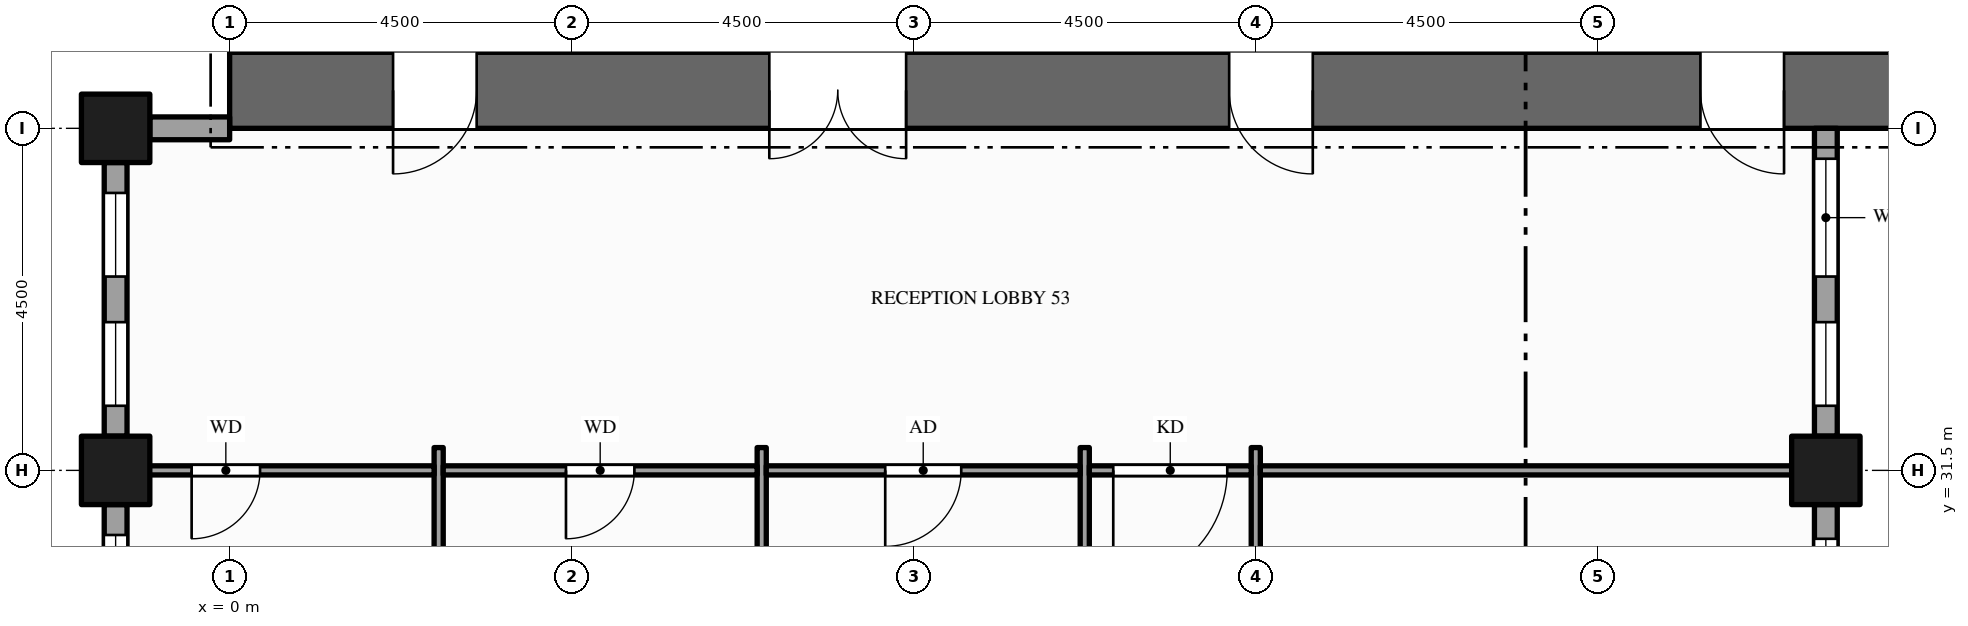
"""IFC4 building model, lengths in metres.
Left out: names, types, materials, properties, quantities, classifications, styles, units other than length and angle.
Written with IfcOpenShell. Run it as: python <this file> out.ifc"""

import sys

from ifc_helpers import new_model, si_unit, direction, frame, frame_2d, origin, origin_2d, place, context, subcontext, project, spatial, rectangle, hollow_rectangle, extrude, element, fill, save


model = new_model("IFC4")
c1 = context("Model", 3, precision=1e-05, world=origin(), true_north=direction((0.0, 1.0)))
c2 = subcontext(c1, "Body", "Model", "MODEL_VIEW")
j1 = project(units=[si_unit("LENGTHUNIT", "METRE"), si_unit("PLANEANGLEUNIT", "RADIAN")], contexts=[c1])
p1 = place(None, origin())
s1 = spatial("IfcSite", under=j1, at=p1, CompositionType="ELEMENT")
p2 = place(p1, origin())
s2 = spatial("IfcBuilding", under=s1, at=p2, CompositionType="ELEMENT")
p3 = place(p2, frame((0.0, 0.0, 179.0)))
s3 = spatial("IfcBuildingStorey", under=s2, at=p3, CompositionType="ELEMENT", Elevation=179.0)
p4 = place(p3, frame((0.0, 36.5, -0.15), z_axis=(0.0, 0.0, 1.0), x_axis=(1.0, 0.0, 0.0)))
e1 = element("IfcWall", 1, at=p4, inside=s3, PredefinedType="SHEAR", context=c2, shape_type="SweptSolid", body=[
    extrude(rectangle(XDim=22.5, YDim=1.0, at=frame_2d((11.25, 0.0))), origin(), (0.0, 0.0, 1.0), 4.0),
])
p5 = place(p4, frame((7.1, 0.0, 0.15)))
e2 = element("IfcOpeningElement", 2, at=p5, cuts=e1, PredefinedType="OPENING", context=c2, shape_type="SweptSolid", body=[
    extrude(rectangle(XDim=1.8, YDim=2.1, at=frame_2d((0.9, 1.05))), frame((0.0, 0.51, 0.0), z_axis=(0.0, -1.0, 0.0), x_axis=(1.0, 0.0, 0.0)), (0.0, 0.0, 1.0), 1.02),
])
p6 = place(p4, frame((13.15, 0.0, 0.15)))
e3 = element("IfcOpeningElement", 3, at=p6, cuts=e1, PredefinedType="OPENING", context=c2, shape_type="SweptSolid", body=[
    extrude(rectangle(XDim=1.1, YDim=2.1, at=frame_2d((0.55, 1.05))), frame((0.0, 0.51, 0.0), z_axis=(0.0, -1.0, 0.0), x_axis=(1.0, 0.0, 0.0)), (0.0, 0.0, 1.0), 1.02),
])
p7 = place(p4, frame((2.15, 0.0, 0.15)))
e4 = element("IfcOpeningElement", 4, at=p7, cuts=e1, PredefinedType="OPENING", context=c2, shape_type="SweptSolid", body=[
    extrude(rectangle(XDim=1.1, YDim=2.1, at=frame_2d((0.55, 1.05))), frame((0.0, 0.51, 0.0), z_axis=(0.0, -1.0, 0.0), x_axis=(1.0, 0.0, 0.0)), (0.0, 0.0, 1.0), 1.02),
])
p8 = place(p4, frame((19.35, 0.0, 0.15)))
e5 = element("IfcOpeningElement", 5, at=p8, cuts=e1, PredefinedType="OPENING", context=c2, shape_type="SweptSolid", body=[
    extrude(rectangle(XDim=1.1, YDim=2.1, at=frame_2d((0.55, 1.05))), frame((0.0, 0.51, 0.0), z_axis=(0.0, -1.0, 0.0), x_axis=(1.0, 0.0, 0.0)), (0.0, 0.0, 1.0), 1.02),
])
for number, where, z_axis, x_axis in (
    (6, (-1.5, 31.5, -0.15), (0.0, 0.0, 1.0), (1.0, 0.0, 0.0)),
    (7, (-1.5, 36.0, -0.15), (0.0, 0.0, 1.0), (1.0, 0.0, 0.0)),
    (8, (21.0, 31.5, -0.15), (0.0, 0.0, 1.0), (1.0, 0.0, 0.0)),
):
    element("IfcColumn", number, at=place(p3, frame(where, z_axis=z_axis, x_axis=x_axis)), inside=s3, PredefinedType="COLUMN", context=c2, shape_type="SweptSolid", body=[
        extrude(hollow_rectangle(XDim=0.9, YDim=0.9, WallThickness=0.045, at=origin_2d()), origin(), (0.0, 0.0, 1.0), 4.0),
    ])
p9 = place(p3, frame((21.0, 28.95, 0.0), z_axis=(0.0, 0.0, 1.0), x_axis=(0.0, 1.0, 0.0)))
e9 = element("IfcWall", 9, at=p9, inside=s3, PredefinedType="STANDARD", context=c2, shape_type="SweptSolid", body=[
    extrude(rectangle(XDim=2.1, YDim=0.3, at=frame_2d((1.05, 0.0))), origin(), (0.0, 0.0, 1.0), 3.149),
])
p10 = place(p9, frame((0.45, 0.0, 0.9)))
e10 = element("IfcOpeningElement", 10, at=p10, cuts=e9, PredefinedType="OPENING", context=c2, shape_type="SweptSolid", body=[
    extrude(rectangle(XDim=1.2, YDim=2.0, at=frame_2d((0.6, 1.0))), frame((0.0, 0.16, 0.0), z_axis=(0.0, -1.0, 0.0), x_axis=(1.0, 0.0, 0.0)), (0.0, 0.0, 1.0), 0.32),
])
p11 = place(p3, frame((21.0, 31.95, 0.0), z_axis=(0.0, 0.0, 1.0), x_axis=(0.0, 1.0, 0.0)))
e11 = element("IfcWall", 11, at=p11, inside=s3, PredefinedType="STANDARD", context=c2, shape_type="SweptSolid", body=[
    extrude(rectangle(XDim=4.05, YDim=0.3, at=frame_2d((2.025, 0.0))), origin(), (0.0, 0.0, 1.0), 3.149),
])
p12 = place(p11, frame((0.4, 0.0, 0.9)))
e12 = element("IfcOpeningElement", 12, at=p12, cuts=e11, PredefinedType="OPENING", context=c2, shape_type="SweptSolid", body=[
    extrude(rectangle(XDim=1.1, YDim=2.0, at=frame_2d((0.55, 1.0))), frame((0.0, 0.16, 0.0), z_axis=(0.0, -1.0, 0.0), x_axis=(1.0, 0.0, 0.0)), (0.0, 0.0, 1.0), 0.32),
])
p13 = place(p11, frame((2.1, 0.0, 0.9)))
e13 = element("IfcOpeningElement", 13, at=p13, cuts=e11, PredefinedType="OPENING", context=c2, shape_type="SweptSolid", body=[
    extrude(rectangle(XDim=1.55, YDim=2.0, at=frame_2d((0.775, 1.0))), frame((0.0, 0.16, 0.0), z_axis=(0.0, -1.0, 0.0), x_axis=(1.0, 0.0, 0.0)), (0.0, 0.0, 1.0), 0.32),
])
p14 = place(p3, frame((0.0, 36.0, 0.0), z_axis=(0.0, 0.0, 1.0), x_axis=(-1.0, 0.0, 0.0)))
e14 = element("IfcWall", 14, at=p14, inside=s3, PredefinedType="STANDARD", context=c2, shape_type="SweptSolid", body=[
    extrude(rectangle(XDim=1.05, YDim=0.3, at=frame_2d((0.525, 0.0))), origin(), (0.0, 0.0, 1.0), 2.87),
])
p15 = place(p3, frame((-1.5, 35.55, 0.0), z_axis=(0.0, 0.0, 1.0), x_axis=(0.0, -1.0, 0.0)))
e15 = element("IfcWall", 15, at=p15, inside=s3, PredefinedType="STANDARD", context=c2, shape_type="SweptSolid", body=[
    extrude(rectangle(XDim=3.6, YDim=0.3, at=frame_2d((1.8, 0.0))), origin(), (0.0, 0.0, 1.0), 3.149),
])
p16 = place(p15, frame((0.4, 0.0, 0.9)))
e16 = element("IfcOpeningElement", 16, at=p16, cuts=e15, PredefinedType="OPENING", context=c2, shape_type="SweptSolid", body=[
    extrude(rectangle(XDim=1.1, YDim=2.0, at=frame_2d((0.55, 1.0))), frame((0.0, 0.16, 0.0), z_axis=(0.0, -1.0, 0.0), x_axis=(1.0, 0.0, 0.0)), (0.0, 0.0, 1.0), 0.32),
])
p17 = place(p15, frame((2.1, 0.0, 0.9)))
e17 = element("IfcOpeningElement", 17, at=p17, cuts=e15, PredefinedType="OPENING", context=c2, shape_type="SweptSolid", body=[
    extrude(rectangle(XDim=1.1, YDim=2.0, at=frame_2d((0.55, 1.0))), frame((0.0, 0.16, 0.0), z_axis=(0.0, -1.0, 0.0), x_axis=(1.0, 0.0, 0.0)), (0.0, 0.0, 1.0), 0.32),
])
p18 = place(p3, frame((-1.5, 31.05, 0.0), z_axis=(0.0, 0.0, 1.0), x_axis=(0.0, -1.0, 0.0)))
e18 = element("IfcWall", 18, at=p18, inside=s3, PredefinedType="STANDARD", context=c2, shape_type="SweptSolid", body=[
    extrude(rectangle(XDim=3.6, YDim=0.3, at=frame_2d((1.8, 0.0))), origin(), (0.0, 0.0, 1.0), 3.149),
])
p19 = place(p18, frame((0.4, 0.0, 0.9)))
e19 = element("IfcOpeningElement", 19, at=p19, cuts=e18, PredefinedType="OPENING", context=c2, shape_type="SweptSolid", body=[
    extrude(rectangle(XDim=1.1, YDim=2.0, at=frame_2d((0.55, 1.0))), frame((0.0, 0.16, 0.0), z_axis=(0.0, -1.0, 0.0), x_axis=(1.0, 0.0, 0.0)), (0.0, 0.0, 1.0), 0.32),
])
p20 = place(p18, frame((2.1, 0.0, 0.9)))
e20 = element("IfcOpeningElement", 20, at=p20, cuts=e18, PredefinedType="OPENING", context=c2, shape_type="SweptSolid", body=[
    extrude(rectangle(XDim=1.1, YDim=2.0, at=frame_2d((0.55, 1.0))), frame((0.0, 0.16, 0.0), z_axis=(0.0, -1.0, 0.0), x_axis=(1.0, 0.0, 0.0)), (0.0, 0.0, 1.0), 0.32),
])
for number, where, z_axis, x_axis in (
    (21, (2.75, 26.7, 0.0), (0.0, 0.0, 1.0), (0.0, 1.0, 0.0)),
    (22, (7.0, 26.7, 0.0), (0.0, 0.0, 1.0), (0.0, 1.0, 0.0)),
):
    element("IfcWall", number, at=place(p3, frame(where, z_axis=z_axis, x_axis=x_axis)), inside=s3, PredefinedType="PARTITIONING", context=c2, shape_type="SweptSolid", body=[
        extrude(rectangle(XDim=5.1, YDim=0.12, at=frame_2d((2.55, 0.0))), origin(), (0.0, 0.0, 1.0), 3.85),
    ])
p21 = place(p3, frame((11.25, 10.95, 0.0), z_axis=(0.0, 0.0, 1.0), x_axis=(0.0, 1.0, 0.0)))
e23 = element("IfcWall", 23, at=p21, inside=s3, PredefinedType="PARTITIONING", context=c2, shape_type="SweptSolid", body=[
    extrude(rectangle(XDim=20.85, YDim=0.12, at=frame_2d((10.425, 0.0))), origin(), (0.0, 0.0, 1.0), 2.6),
])
p22 = place(p21, frame((2.05, 0.0, 0.0)))
e24 = element("IfcOpeningElement", 24, at=p22, cuts=e23, PredefinedType="OPENING", context=c2, shape_type="SweptSolid", body=[
    extrude(rectangle(XDim=1.0, YDim=2.1, at=frame_2d((0.5, 1.05))), frame((0.0, 0.07, 0.0), z_axis=(0.0, -1.0, 0.0), x_axis=(1.0, 0.0, 0.0)), (0.0, 0.0, 1.0), 0.14),
])
p23 = place(p21, frame((6.55, 0.0, 0.0)))
e25 = element("IfcOpeningElement", 25, at=p23, cuts=e23, PredefinedType="OPENING", context=c2, shape_type="SweptSolid", body=[
    extrude(rectangle(XDim=1.0, YDim=2.1, at=frame_2d((0.5, 1.05))), frame((0.0, 0.07, 0.0), z_axis=(0.0, -1.0, 0.0), x_axis=(1.0, 0.0, 0.0)), (0.0, 0.0, 1.0), 0.14),
])
p24 = place(p21, frame((12.205, 0.0, 0.0)))
e26 = element("IfcOpeningElement", 26, at=p24, cuts=e23, PredefinedType="OPENING", context=c2, shape_type="SweptSolid", body=[
    extrude(rectangle(XDim=1.0, YDim=2.1, at=frame_2d((0.5, 1.05))), frame((0.0, 0.07, 0.0), z_axis=(0.0, -1.0, 0.0), x_axis=(1.0, 0.0, 0.0)), (0.0, 0.0, 1.0), 0.14),
])
p25 = place(p3, frame((13.5, 10.95, 0.0), z_axis=(0.0, 0.0, 1.0), x_axis=(0.0, 1.0, 0.0)))
e27 = element("IfcWall", 27, at=p25, inside=s3, PredefinedType="PARTITIONING", context=c2, shape_type="SweptSolid", body=[
    extrude(rectangle(XDim=20.85, YDim=0.12, at=frame_2d((10.425, 0.0))), origin(), (0.0, 0.0, 1.0), 2.6),
])
p26 = place(p25, frame((4.2, 0.0, 0.0)))
e28 = element("IfcOpeningElement", 28, at=p26, cuts=e27, PredefinedType="OPENING", context=c2, shape_type="SweptSolid", body=[
    extrude(rectangle(XDim=1.2, YDim=2.1, at=frame_2d((0.6, 1.05))), frame((0.0, 0.07, 0.0), z_axis=(0.0, -1.0, 0.0), x_axis=(1.0, 0.0, 0.0)), (0.0, 0.0, 1.0), 0.14),
])
p27 = place(p3, frame((-1.35, 31.5, 0.0), z_axis=(0.0, 0.0, 1.0), x_axis=(1.0, 0.0, 0.0)))
e29 = element("IfcWall", 29, at=p27, inside=s3, PredefinedType="PARTITIONING", context=c2, shape_type="SweptSolid", body=[
    extrude(rectangle(XDim=4.04, YDim=0.12, at=frame_2d((2.02, 0.0))), origin(), (0.0, 0.0, 1.0), 2.87),
])
p28 = place(p27, frame((0.85, 0.0, 0.0)))
e30 = element("IfcOpeningElement", 30, at=p28, cuts=e29, PredefinedType="OPENING", context=c2, shape_type="SweptSolid", body=[
    extrude(rectangle(XDim=0.9, YDim=2.1, at=frame_2d((0.45, 1.05))), frame((0.0, 0.07, 0.0), z_axis=(0.0, -1.0, 0.0), x_axis=(1.0, 0.0, 0.0)), (0.0, 0.0, 1.0), 0.14),
])
p29 = place(p3, frame((2.81, 31.5, 0.0), z_axis=(0.0, 0.0, 1.0), x_axis=(1.0, 0.0, 0.0)))
e31 = element("IfcWall", 31, at=p29, inside=s3, PredefinedType="PARTITIONING", context=c2, shape_type="SweptSolid", body=[
    extrude(rectangle(XDim=4.13, YDim=0.12, at=frame_2d((2.065, 0.0))), origin(), (0.0, 0.0, 1.0), 2.87),
])
p30 = place(p29, frame((1.615, 0.0, 0.0)))
e32 = element("IfcOpeningElement", 32, at=p30, cuts=e31, PredefinedType="OPENING", context=c2, shape_type="SweptSolid", body=[
    extrude(rectangle(XDim=0.9, YDim=2.1, at=frame_2d((0.45, 1.05))), frame((0.0, 0.07, 0.0), z_axis=(0.0, -1.0, 0.0), x_axis=(1.0, 0.0, 0.0)), (0.0, 0.0, 1.0), 0.14),
])
p31 = place(p3, frame((7.06, 31.5, 0.0), z_axis=(0.0, 0.0, 1.0), x_axis=(1.0, 0.0, 0.0)))
e33 = element("IfcWall", 33, at=p31, inside=s3, PredefinedType="PARTITIONING", context=c2, shape_type="SweptSolid", body=[
    extrude(rectangle(XDim=4.13, YDim=0.12, at=frame_2d((2.065, 0.0))), origin(), (0.0, 0.0, 1.0), 2.87),
])
p32 = place(p31, frame((1.565, 0.0, 0.0)))
e34 = element("IfcOpeningElement", 34, at=p32, cuts=e33, PredefinedType="OPENING", context=c2, shape_type="SweptSolid", body=[
    extrude(rectangle(XDim=1.0, YDim=2.1, at=frame_2d((0.5, 1.05))), frame((0.0, 0.07, 0.0), z_axis=(0.0, -1.0, 0.0), x_axis=(1.0, 0.0, 0.0)), (0.0, 0.0, 1.0), 0.14),
])
p33 = place(p3, frame((11.31, 31.5, 0.0), z_axis=(0.0, 0.0, 1.0), x_axis=(1.0, 0.0, 0.0)))
e35 = element("IfcWall", 35, at=p33, inside=s3, PredefinedType="PARTITIONING", context=c2, shape_type="SweptSolid", body=[
    extrude(rectangle(XDim=2.13, YDim=0.12, at=frame_2d((1.065, 0.0))), origin(), (0.0, 0.0, 1.0), 2.87),
])
p34 = place(p33, frame((0.315, 0.0, 0.0)))
e36 = element("IfcOpeningElement", 36, at=p34, cuts=e35, PredefinedType="OPENING", context=c2, shape_type="SweptSolid", body=[
    extrude(rectangle(XDim=1.5, YDim=2.1, at=frame_2d((0.75, 1.05))), frame((0.0, 0.07, 0.0), z_axis=(0.0, -1.0, 0.0), x_axis=(1.0, 0.0, 0.0)), (0.0, 0.0, 1.0), 0.14),
])
p35 = place(p3, frame((13.56, 31.5, 0.0), z_axis=(0.0, 0.0, 1.0), x_axis=(1.0, 0.0, 0.0)))
e37 = element("IfcWall", 37, at=p35, inside=s3, PredefinedType="PARTITIONING", context=c2, shape_type="SweptSolid", body=[
    extrude(rectangle(XDim=7.29, YDim=0.12, at=frame_2d((3.645, 0.0))), origin(), (0.0, 0.0, 1.0), 2.87),
])
p36 = place(p10, origin())
e38 = element("IfcWindow", 38, at=p36, inside=s3, PartitioningType="SINGLE_PANEL", PredefinedType="WINDOW", context=c2, shape_type="SweptSolid", body=[
    extrude(rectangle(XDim=1.2, YDim=2.0, at=frame_2d((0.6, 1.0))), frame((0.0, 0.03, 0.0), z_axis=(0.0, -1.0, 0.0), x_axis=(1.0, 0.0, 0.0)), (0.0, 0.0, 1.0), 0.06),
])
fill(e10, e38)
p37 = place(p12, origin())
e39 = element("IfcWindow", 39, at=p37, inside=s3, PartitioningType="SINGLE_PANEL", PredefinedType="WINDOW", context=c2, shape_type="SweptSolid", body=[
    extrude(rectangle(XDim=1.1, YDim=2.0, at=frame_2d((0.55, 1.0))), frame((0.0, 0.03, 0.0), z_axis=(0.0, -1.0, 0.0), x_axis=(1.0, 0.0, 0.0)), (0.0, 0.0, 1.0), 0.06),
])
fill(e12, e39)
p38 = place(p13, origin())
e40 = element("IfcWindow", 40, at=p38, inside=s3, PartitioningType="SINGLE_PANEL", PredefinedType="WINDOW", context=c2, shape_type="SweptSolid", body=[
    extrude(rectangle(XDim=1.55, YDim=2.0, at=frame_2d((0.775, 1.0))), frame((0.0, 0.03, 0.0), z_axis=(0.0, -1.0, 0.0), x_axis=(1.0, 0.0, 0.0)), (0.0, 0.0, 1.0), 0.06),
])
fill(e13, e40)
p39 = place(p16, origin())
e41 = element("IfcWindow", 41, at=p39, inside=s3, PartitioningType="SINGLE_PANEL", PredefinedType="WINDOW", context=c2, shape_type="SweptSolid", body=[
    extrude(rectangle(XDim=1.1, YDim=2.0, at=frame_2d((0.55, 1.0))), frame((0.0, 0.03, 0.0), z_axis=(0.0, -1.0, 0.0), x_axis=(1.0, 0.0, 0.0)), (0.0, 0.0, 1.0), 0.06),
])
fill(e16, e41)
p40 = place(p17, origin())
e42 = element("IfcWindow", 42, at=p40, inside=s3, PartitioningType="SINGLE_PANEL", PredefinedType="WINDOW", context=c2, shape_type="SweptSolid", body=[
    extrude(rectangle(XDim=1.1, YDim=2.0, at=frame_2d((0.55, 1.0))), frame((0.0, 0.03, 0.0), z_axis=(0.0, -1.0, 0.0), x_axis=(1.0, 0.0, 0.0)), (0.0, 0.0, 1.0), 0.06),
])
fill(e17, e42)
p41 = place(p19, origin())
e43 = element("IfcWindow", 43, at=p41, inside=s3, PartitioningType="SINGLE_PANEL", PredefinedType="WINDOW", context=c2, shape_type="SweptSolid", body=[
    extrude(rectangle(XDim=1.1, YDim=2.0, at=frame_2d((0.55, 1.0))), frame((0.0, 0.03, 0.0), z_axis=(0.0, -1.0, 0.0), x_axis=(1.0, 0.0, 0.0)), (0.0, 0.0, 1.0), 0.06),
])
fill(e19, e43)
p42 = place(p5, origin())
e44 = element("IfcDoor", 44, at=p42, inside=s3, OperationType="DOUBLE_DOOR_SINGLE_SWING", PredefinedType="DOOR", context=c2, shape_type="SweptSolid", body=[
    extrude(rectangle(XDim=1.8, YDim=2.1, at=frame_2d((0.9, 1.05))), frame((0.0, 0.025, 0.0), z_axis=(0.0, -1.0, 0.0), x_axis=(1.0, 0.0, 0.0)), (0.0, 0.0, 1.0), 0.05),
])
fill(e2, e44)
p43 = place(p6, origin())
e45 = element("IfcDoor", 45, at=p43, inside=s3, OperationType="SINGLE_SWING_RIGHT", PredefinedType="DOOR", context=c2, shape_type="SweptSolid", body=[
    extrude(rectangle(XDim=1.1, YDim=2.1, at=frame_2d((0.55, 1.05))), frame((0.0, 0.025, 0.0), z_axis=(0.0, -1.0, 0.0), x_axis=(1.0, 0.0, 0.0)), (0.0, 0.0, 1.0), 0.05),
])
fill(e3, e45)
p44 = place(p7, origin())
e46 = element("IfcDoor", 46, at=p44, inside=s3, OperationType="SINGLE_SWING_LEFT", PredefinedType="DOOR", context=c2, shape_type="SweptSolid", body=[
    extrude(rectangle(XDim=1.1, YDim=2.1, at=frame_2d((0.55, 1.05))), frame((0.0, 0.025, 0.0), z_axis=(0.0, -1.0, 0.0), x_axis=(1.0, 0.0, 0.0)), (0.0, 0.0, 1.0), 0.05),
])
fill(e4, e46)
p45 = place(p8, origin())
e47 = element("IfcDoor", 47, at=p45, inside=s3, OperationType="SINGLE_SWING_RIGHT", PredefinedType="DOOR", context=c2, shape_type="SweptSolid", body=[
    extrude(rectangle(XDim=1.1, YDim=2.1, at=frame_2d((0.55, 1.05))), frame((0.0, 0.025, 0.0), z_axis=(0.0, -1.0, 0.0), x_axis=(1.0, 0.0, 0.0)), (0.0, 0.0, 1.0), 0.05),
])
fill(e5, e47)
p46 = place(p34, origin())
e48 = element("IfcDoor", 48, at=p46, inside=s3, OperationType="SINGLE_SWING_LEFT", PredefinedType="DOOR", context=c2, shape_type="SweptSolid", body=[
    extrude(rectangle(XDim=1.5, YDim=2.1, at=frame_2d((0.75, 1.05))), frame((0.0, 0.025, 0.0), z_axis=(0.0, -1.0, 0.0), x_axis=(1.0, 0.0, 0.0)), (0.0, 0.0, 1.0), 0.05),
])
fill(e36, e48)
p47 = place(p28, origin())
e49 = element("IfcDoor", 49, at=p47, inside=s3, OperationType="SINGLE_SWING_LEFT", PredefinedType="DOOR", context=c2, shape_type="SweptSolid", body=[
    extrude(rectangle(XDim=0.9, YDim=2.1, at=frame_2d((0.45, 1.05))), frame((0.0, 0.025, 0.0), z_axis=(0.0, -1.0, 0.0), x_axis=(1.0, 0.0, 0.0)), (0.0, 0.0, 1.0), 0.05),
])
fill(e30, e49)
p48 = place(p30, origin())
e50 = element("IfcDoor", 50, at=p48, inside=s3, OperationType="SINGLE_SWING_LEFT", PredefinedType="DOOR", context=c2, shape_type="SweptSolid", body=[
    extrude(rectangle(XDim=0.9, YDim=2.1, at=frame_2d((0.45, 1.05))), frame((0.0, 0.025, 0.0), z_axis=(0.0, -1.0, 0.0), x_axis=(1.0, 0.0, 0.0)), (0.0, 0.0, 1.0), 0.05),
])
fill(e32, e50)
p49 = place(p32, origin())
e51 = element("IfcDoor", 51, at=p49, inside=s3, OperationType="SINGLE_SWING_LEFT", PredefinedType="DOOR", context=c2, shape_type="SweptSolid", body=[
    extrude(rectangle(XDim=1.0, YDim=2.1, at=frame_2d((0.5, 1.05))), frame((0.0, 0.025, 0.0), z_axis=(0.0, -1.0, 0.0), x_axis=(1.0, 0.0, 0.0)), (0.0, 0.0, 1.0), 0.05),
])
fill(e34, e51)
save(model, sys.argv[1])
